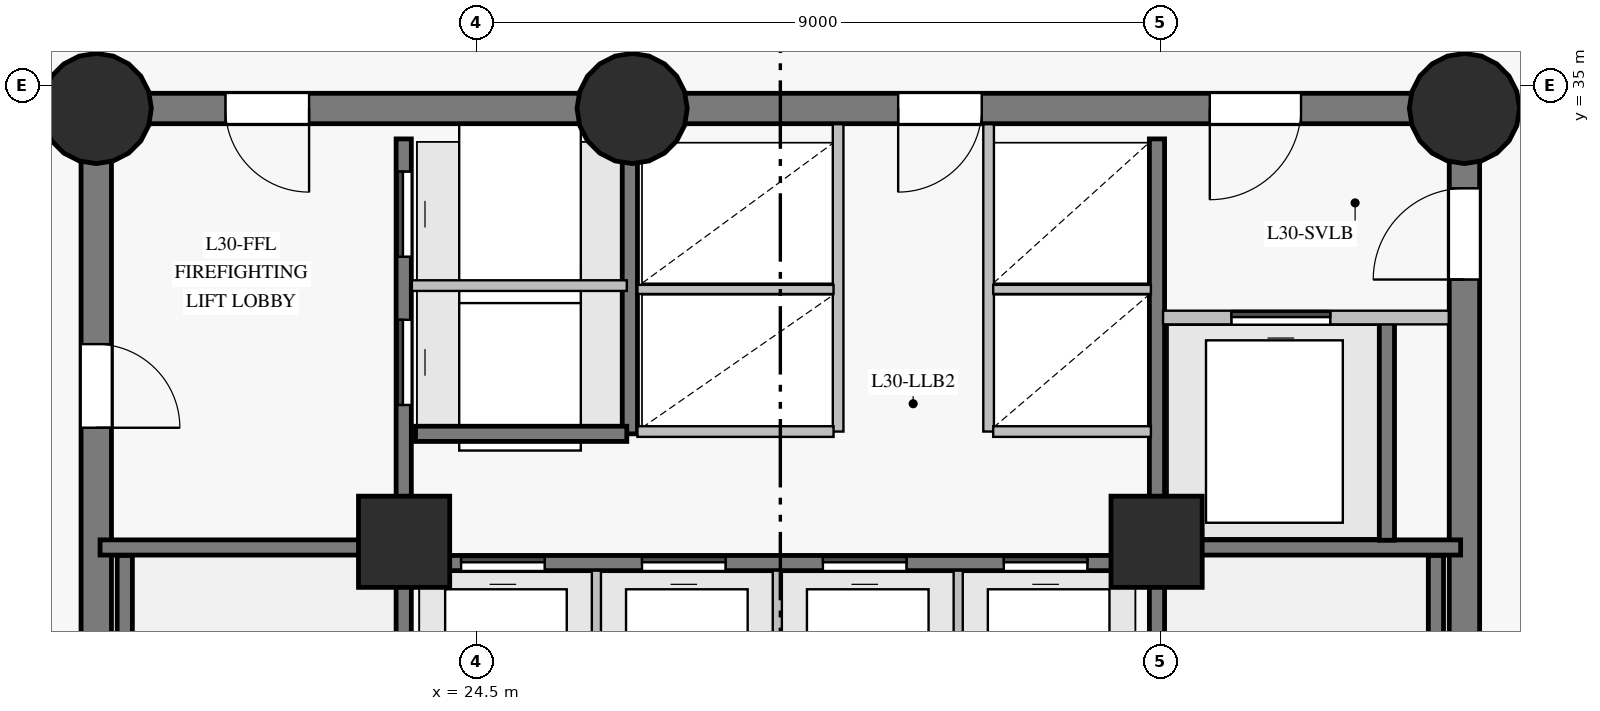
"""IFC4 building model, lengths in metres.
Left out: names, types, materials, properties, quantities, classifications, styles, units other than length and angle.
Written with IfcOpenShell. Run it as: python <this file> out.ifc"""

import sys

from ifc_helpers import new_model, si_unit, direction, frame, frame_2d, origin, origin_with_axes, origin_2d, place, context, subcontext, project, spatial, rectangle, circle, extrude, source, transform, mapped, element, fill, save


model = new_model("IFC4")
c1 = context("Model", 3, precision=1e-05, world=origin(), true_north=direction((0.0, 1.0)))
c2 = subcontext(c1, "Body", "Model", "MODEL_VIEW")
j1 = project(units=[si_unit("LENGTHUNIT", "METRE"), si_unit("PLANEANGLEUNIT", "RADIAN")], contexts=[c1])
p1 = place(None, origin())
s1 = spatial("IfcSite", under=j1, at=p1, CompositionType="ELEMENT")
p2 = place(p1, origin())
s2 = spatial("IfcBuilding", under=s1, at=p2, CompositionType="ELEMENT")
p3 = place(p2, frame((0.0, 0.0, 111.45)))
s3 = spatial("IfcBuildingStorey", under=s2, at=p3, CompositionType="ELEMENT", Elevation=111.45)
p4 = place(p3, frame((37.5, 18.3, 0.0), z_axis=(0.0, 0.0, 1.0), x_axis=(0.0, 1.0, 0.0)))
e1 = element("IfcWall", 1, at=p4, inside=s3, PredefinedType="SHEAR", context=c2, shape_type="SweptSolid", body=[
    extrude(rectangle(XDim=16.4, YDim=0.4, at=frame_2d((8.2, 0.0))), origin(), (0.0, 0.0, 1.0), 2.825),
])
p5 = place(p4, frame((14.15, 0.0, 0.0)))
e2 = element("IfcOpeningElement", 2, at=p5, cuts=e1, PredefinedType="OPENING", context=c2, shape_type="SweptSolid", body=[
    extrude(rectangle(XDim=1.2, YDim=2.15, at=frame_2d((0.6, 1.075))), frame((0.0, 0.21, 0.0), z_axis=(0.0, -1.0, 0.0), x_axis=(1.0, 0.0, 0.0)), (0.0, 0.0, 1.0), 0.42),
])
p6 = place(p3, frame((37.5, 34.7, 0.0), z_axis=(0.0, 0.0, 1.0), x_axis=(-1.0, 0.0, 0.0)))
e3 = element("IfcWall", 3, at=p6, inside=s3, PredefinedType="SHEAR", context=c2, shape_type="SweptSolid", body=[
    extrude(rectangle(XDim=10.95, YDim=0.4, at=frame_2d((5.475, 0.0))), origin(), (0.0, 0.0, 1.0), 2.825),
])
p7 = place(p6, frame((2.15, 0.0, 0.0)))
e4 = element("IfcOpeningElement", 4, at=p7, cuts=e3, PredefinedType="OPENING", context=c2, shape_type="SweptSolid", body=[
    extrude(rectangle(XDim=1.2, YDim=2.15, at=frame_2d((0.6, 1.075))), frame((0.0, 0.21, 0.0), z_axis=(0.0, -1.0, 0.0), x_axis=(1.0, 0.0, 0.0)), (0.0, 0.0, 1.0), 0.42),
])
p8 = place(p6, frame((6.35, 0.0, 0.0)))
e5 = element("IfcOpeningElement", 5, at=p8, cuts=e3, PredefinedType="OPENING", context=c2, shape_type="SweptSolid", body=[
    extrude(rectangle(XDim=1.1, YDim=2.15, at=frame_2d((0.55, 1.075))), frame((0.0, 0.21, 0.0), z_axis=(0.0, -1.0, 0.0), x_axis=(1.0, 0.0, 0.0)), (0.0, 0.0, 1.0), 0.42),
])
p9 = place(p3, frame((26.55, 34.7, 0.0), z_axis=(0.0, 0.0, 1.0), x_axis=(-1.0, 0.0, 0.0)))
e6 = element("IfcWall", 6, at=p9, inside=s3, PredefinedType="SHEAR", context=c2, shape_type="SweptSolid", body=[
    extrude(rectangle(XDim=7.05, YDim=0.4, at=frame_2d((3.525, 0.0))), origin(), (0.0, 0.0, 1.0), 2.825),
])
p10 = place(p9, frame((4.25, 0.0, 0.0)))
e7 = element("IfcOpeningElement", 7, at=p10, cuts=e6, PredefinedType="OPENING", context=c2, shape_type="SweptSolid", body=[
    extrude(rectangle(XDim=1.1, YDim=2.15, at=frame_2d((0.55, 1.075))), frame((0.0, 0.21, 0.0), z_axis=(0.0, -1.0, 0.0), x_axis=(1.0, 0.0, 0.0)), (0.0, 0.0, 1.0), 0.42),
])
p11 = place(p3, frame((19.5, 34.7, 0.0), z_axis=(0.0, 0.0, 1.0), x_axis=(0.0, -1.0, 0.0)))
e8 = element("IfcWall", 8, at=p11, inside=s3, PredefinedType="SHEAR", context=c2, shape_type="SweptSolid", body=[
    extrude(rectangle(XDim=16.4, YDim=0.4, at=frame_2d((8.2, 0.0))), origin(), (0.0, 0.0, 1.0), 2.825),
])
p12 = place(p11, frame((3.1, 0.0, 0.0)))
e9 = element("IfcOpeningElement", 9, at=p12, cuts=e8, PredefinedType="OPENING", context=c2, shape_type="SweptSolid", body=[
    extrude(rectangle(XDim=1.1, YDim=2.15, at=frame_2d((0.55, 1.075))), frame((0.0, 0.21, 0.0), z_axis=(0.0, -1.0, 0.0), x_axis=(1.0, 0.0, 0.0)), (0.0, 0.0, 1.0), 0.42),
])
m1 = source(origin_with_axes(), c2, "Body", "SweptSolid", [
    extrude(circle(Radius=0.725, at=origin_2d()), origin(), (0.0, 0.0, 1.0), 3.05),
])
for number, where, z_axis, x_axis in (
    (10, (19.5, 34.7, 0.0), (0.0, 0.0, 1.0), (1.0, 0.0, 0.0)),
    (11, (26.55, 34.7, 0.0), (0.0, 0.0, 1.0), (1.0, 0.0, 0.0)),
    (12, (37.5, 34.7, 0.0), (0.0, 0.0, 1.0), (1.0, 0.0, 0.0)),
):
    element("IfcColumn", number, at=place(p3, frame(where, z_axis=z_axis, x_axis=x_axis)), inside=s3, PredefinedType="COLUMN", context=c2, shape_type="MappedRepresentation", body=[
        mapped(m1, transform((0.0, 0.0, 0.0), scale=1.0)),
    ])
m2 = source(origin_with_axes(), c2, "Body", "SweptSolid", [
    extrude(rectangle(XDim=1.2, YDim=1.2, at=origin_2d()), origin(), (0.0, 0.0, 1.0), 3.05),
])
for number, where, z_axis, x_axis in (
    (13, (23.55, 29.0, 0.0), (0.0, 0.0, 1.0), (1.0, 0.0, 0.0)),
    (14, (33.45, 29.0, 0.0), (0.0, 0.0, 1.0), (1.0, 0.0, 0.0)),
):
    element("IfcColumn", number, at=place(p3, frame(where, z_axis=z_axis, x_axis=x_axis)), inside=s3, PredefinedType="COLUMN", context=c2, shape_type="MappedRepresentation", body=[
        mapped(m2, transform((0.0, 0.0, 0.0), scale=1.0)),
    ])
p13 = place(p3, frame((23.545, 18.7, 0.0), z_axis=(0.0, 0.0, 1.0), x_axis=(0.0, 1.0, 0.0)))
e15 = element("IfcWall", 15, at=p13, inside=s3, PredefinedType="SHEAR", context=c2, shape_type="SweptSolid", body=[
    extrude(rectangle(XDim=15.6, YDim=0.2, at=frame_2d((7.8, 0.0))), origin(), (0.0, 0.0, 1.0), 2.825),
])
p14 = place(p13, frame((2.75, 0.0, 0.0)))
e16 = element("IfcOpeningElement", 16, at=p14, cuts=e15, PredefinedType="OPENING", context=c2, shape_type="SweptSolid", body=[
    extrude(rectangle(XDim=1.15, YDim=2.15, at=frame_2d((0.575, 1.075))), frame((0.0, 0.11, 0.0), z_axis=(0.0, -1.0, 0.0), x_axis=(1.0, 0.0, 0.0)), (0.0, 0.0, 1.0), 0.22),
])
p15 = place(p13, frame((0.14, 0.0, 0.0)))
e17 = element("IfcOpeningElement", 17, at=p15, cuts=e15, PredefinedType="OPENING", context=c2, shape_type="SweptSolid", body=[
    extrude(rectangle(XDim=0.88, YDim=2.1, at=frame_2d((0.44, 1.05))), frame((0.0, 0.11, 0.0), z_axis=(0.0, -1.0, 0.0), x_axis=(1.0, 0.0, 0.0)), (0.0, 0.0, 1.0), 0.22),
])
p16 = place(p13, frame((1.36, 0.0, 0.0)))
e18 = element("IfcOpeningElement", 18, at=p16, cuts=e15, PredefinedType="OPENING", context=c2, shape_type="SweptSolid", body=[
    extrude(rectangle(XDim=0.88, YDim=2.1, at=frame_2d((0.44, 1.05))), frame((0.0, 0.11, 0.0), z_axis=(0.0, -1.0, 0.0), x_axis=(1.0, 0.0, 0.0)), (0.0, 0.0, 1.0), 0.22),
])
p17 = place(p13, frame((12.1, 0.0, 0.0)))
e19 = element("IfcOpeningElement", 19, at=p17, cuts=e15, PredefinedType="OPENING", context=c2, shape_type="SweptSolid", body=[
    extrude(rectangle(XDim=1.12, YDim=2.15, at=frame_2d((0.56, 1.075))), frame((0.0, 0.11, 0.0), z_axis=(0.0, -1.0, 0.0), x_axis=(1.0, 0.0, 0.0)), (0.0, 0.0, 1.0), 0.22),
])
p18 = place(p13, frame((14.05, 0.0, 0.0)))
e20 = element("IfcOpeningElement", 20, at=p18, cuts=e15, PredefinedType="OPENING", context=c2, shape_type="SweptSolid", body=[
    extrude(rectangle(XDim=1.12, YDim=2.15, at=frame_2d((0.56, 1.075))), frame((0.0, 0.11, 0.0), z_axis=(0.0, -1.0, 0.0), x_axis=(1.0, 0.0, 0.0)), (0.0, 0.0, 1.0), 0.22),
])
p19 = place(p3, frame((33.455, 18.7, 0.0), z_axis=(0.0, 0.0, 1.0), x_axis=(0.0, 1.0, 0.0)))
e21 = element("IfcWall", 21, at=p19, inside=s3, PredefinedType="SHEAR", context=c2, shape_type="SweptSolid", body=[
    extrude(rectangle(XDim=15.6, YDim=0.2, at=frame_2d((7.8, 0.0))), origin(), (0.0, 0.0, 1.0), 2.825),
])
p20 = place(p19, frame((2.75, 0.0, 0.0)))
e22 = element("IfcOpeningElement", 22, at=p20, cuts=e21, PredefinedType="OPENING", context=c2, shape_type="SweptSolid", body=[
    extrude(rectangle(XDim=1.15, YDim=2.15, at=frame_2d((0.575, 1.075))), frame((0.0, 0.11, 0.0), z_axis=(0.0, -1.0, 0.0), x_axis=(1.0, 0.0, 0.0)), (0.0, 0.0, 1.0), 0.22),
])
p21 = place(p19, frame((0.55, 0.0, 0.0)))
e23 = element("IfcOpeningElement", 23, at=p21, cuts=e21, PredefinedType="OPENING", context=c2, shape_type="SweptSolid", body=[
    extrude(rectangle(XDim=0.94, YDim=2.1, at=frame_2d((0.47, 1.05))), frame((0.0, 0.11, 0.0), z_axis=(0.0, -1.0, 0.0), x_axis=(1.0, 0.0, 0.0)), (0.0, 0.0, 1.0), 0.22),
])
p22 = place(p3, frame((23.7, 28.72, 0.0), z_axis=(0.0, 0.0, 1.0), x_axis=(1.0, 0.0, 0.0)))
e24 = element("IfcWall", 24, at=p22, inside=s3, PredefinedType="SHEAR", context=c2, shape_type="SweptSolid", body=[
    extrude(rectangle(XDim=9.6, YDim=0.2, at=frame_2d((4.8, 0.0))), origin(), (0.0, 0.0, 1.0), 2.825),
])
p23 = place(p22, frame((0.6, 0.0, 0.0)))
e25 = element("IfcOpeningElement", 25, at=p23, cuts=e24, PredefinedType="OPENING", context=c2, shape_type="SweptSolid", body=[
    extrude(rectangle(XDim=1.1, YDim=2.15, at=frame_2d((0.55, 1.075))), frame((0.0, 0.11, 0.0), z_axis=(0.0, -1.0, 0.0), x_axis=(1.0, 0.0, 0.0)), (0.0, 0.0, 1.0), 0.22),
])
p24 = place(p22, frame((2.98, 0.0, 0.0)))
e26 = element("IfcOpeningElement", 26, at=p24, cuts=e24, PredefinedType="OPENING", context=c2, shape_type="SweptSolid", body=[
    extrude(rectangle(XDim=1.1, YDim=2.15, at=frame_2d((0.55, 1.075))), frame((0.0, 0.11, 0.0), z_axis=(0.0, -1.0, 0.0), x_axis=(1.0, 0.0, 0.0)), (0.0, 0.0, 1.0), 0.22),
])
p25 = place(p22, frame((5.36, 0.0, 0.0)))
e27 = element("IfcOpeningElement", 27, at=p25, cuts=e24, PredefinedType="OPENING", context=c2, shape_type="SweptSolid", body=[
    extrude(rectangle(XDim=1.1, YDim=2.15, at=frame_2d((0.55, 1.075))), frame((0.0, 0.11, 0.0), z_axis=(0.0, -1.0, 0.0), x_axis=(1.0, 0.0, 0.0)), (0.0, 0.0, 1.0), 0.22),
])
p26 = place(p22, frame((7.74, 0.0, 0.0)))
e28 = element("IfcOpeningElement", 28, at=p26, cuts=e24, PredefinedType="OPENING", context=c2, shape_type="SweptSolid", body=[
    extrude(rectangle(XDim=1.1, YDim=2.15, at=frame_2d((0.55, 1.075))), frame((0.0, 0.11, 0.0), z_axis=(0.0, -1.0, 0.0), x_axis=(1.0, 0.0, 0.0)), (0.0, 0.0, 1.0), 0.22),
])
for number, where, z_axis, x_axis in (
    (29, (19.875, 21.32, 0.0), (0.0, 0.0, 1.0), (0.0, 1.0, 0.0)),
    (30, (37.125, 21.32, 0.0), (0.0, 0.0, 1.0), (0.0, 1.0, 0.0)),
):
    element("IfcWall", number, at=place(p3, frame(where, z_axis=z_axis, x_axis=x_axis)), inside=s3, PredefinedType="SHEAR", context=c2, shape_type="SweptSolid", body=[
        extrude(rectangle(XDim=7.5, YDim=0.2, at=frame_2d((3.75, 0.0))), origin(), (0.0, 0.0, 1.0), 2.825),
    ])
for number, where, z_axis, x_axis in (
    (31, (33.455, 28.925, 0.0), (0.0, 0.0, 1.0), (1.0, 0.0, 0.0)),
    (32, (19.55, 28.925, 0.0), (0.0, 0.0, 1.0), (1.0, 0.0, 0.0)),
):
    element("IfcWall", number, at=place(p3, frame(where, z_axis=z_axis, x_axis=x_axis)), inside=s3, PredefinedType="SHEAR", context=c2, shape_type="SweptSolid", body=[
        extrude(rectangle(XDim=3.995, YDim=0.2, at=frame_2d((1.998, 0.0))), origin(), (0.0, 0.0, 1.0), 2.825),
    ])
p27 = place(p3, frame((26.52, 30.42, 0.0), z_axis=(0.0, 0.0, 1.0), x_axis=(0.0, 1.0, 0.0)))
e33 = element("IfcWall", 33, at=p27, inside=s3, PredefinedType="SHEAR", context=c2, shape_type="SweptSolid", body=[
    extrude(rectangle(XDim=3.86, YDim=0.2, at=frame_2d((1.93, 0.0))), origin(), (0.0, 0.0, 1.0), 2.825),
])
p28 = place(p3, frame((36.48, 29.02, 0.0), z_axis=(0.0, 0.0, 1.0), x_axis=(0.0, 1.0, 0.0)))
e34 = element("IfcWall", 34, at=p28, inside=s3, PredefinedType="SHEAR", context=c2, shape_type="SweptSolid", body=[
    extrude(rectangle(XDim=2.86, YDim=0.2, at=frame_2d((1.43, 0.0))), origin(), (0.0, 0.0, 1.0), 2.825),
])
p29 = place(p3, frame((23.7, 30.42, 0.0), z_axis=(0.0, 0.0, 1.0), x_axis=(1.0, 0.0, 0.0)))
e35 = element("IfcWall", 35, at=p29, inside=s3, PredefinedType="SHEAR", context=c2, shape_type="SweptSolid", body=[
    extrude(rectangle(XDim=2.78, YDim=0.2, at=frame_2d((1.39, 0.0))), origin(), (0.0, 0.0, 1.0), 2.825),
])
for number, where, z_axis, x_axis in (
    (36, (29.26, 30.45, 0.0), (0.0, 0.0, 1.0), (0.0, 1.0, 0.0)),
    (37, (31.24, 30.45, 0.0), (0.0, 0.0, 1.0), (0.0, 1.0, 0.0)),
):
    element("IfcWall", number, at=place(p3, frame(where, z_axis=z_axis, x_axis=x_axis)), inside=s3, PredefinedType="PARTITIONING", context=c2, shape_type="SweptSolid", body=[
        extrude(rectangle(XDim=4.043, YDim=0.14, at=frame_2d((2.021, 0.0))), origin(), (0.0, 0.0, 1.0), 2.825),
    ])
p30 = place(p3, frame((33.535, 31.95, 0.0), z_axis=(0.0, 0.0, 1.0), x_axis=(1.0, 0.0, 0.0)))
e38 = element("IfcWall", 38, at=p30, inside=s3, PredefinedType="PARTITIONING", context=c2, shape_type="SweptSolid", body=[
    extrude(rectangle(XDim=3.759, YDim=0.18, at=frame_2d((1.879, 0.0))), origin(), (0.0, 0.0, 1.0), 2.825),
])
p31 = place(p30, frame((0.9, 0.0, 0.0)))
e39 = element("IfcOpeningElement", 39, at=p31, cuts=e38, PredefinedType="OPENING", context=c2, shape_type="SweptSolid", body=[
    extrude(rectangle(XDim=1.3, YDim=2.2, at=frame_2d((0.65, 1.1))), frame((0.0, 0.1, 0.0), z_axis=(0.0, -1.0, 0.0), x_axis=(1.0, 0.0, 0.0)), (0.0, 0.0, 1.0), 0.2),
])
p32 = place(p3, frame((23.652, 32.37, 0.0), z_axis=(0.0, 0.0, 1.0), x_axis=(1.0, 0.0, 0.0)))
e40 = element("IfcWall", 40, at=p32, inside=s3, PredefinedType="PARTITIONING", context=c2, shape_type="SweptSolid", body=[
    extrude(rectangle(XDim=2.828, YDim=0.14, at=frame_2d((1.414, 0.0))), origin(), (0.0, 0.0, 1.0), 2.825),
])
for number, where, z_axis, x_axis in (
    (41, (26.08, 26.02, 0.0), (0.0, 0.0, 1.0), (0.0, 1.0, 0.0)),
    (42, (28.46, 26.02, 0.0), (0.0, 0.0, 1.0), (0.0, 1.0, 0.0)),
    (43, (30.84, 26.02, 0.0), (0.0, 0.0, 1.0), (0.0, 1.0, 0.0)),
):
    element("IfcWall", number, at=place(p3, frame(where, z_axis=z_axis, x_axis=x_axis)), inside=s3, PredefinedType="PARTITIONING", context=c2, shape_type="SweptSolid", body=[
        extrude(rectangle(XDim=2.6, YDim=0.12, at=frame_2d((1.3, 0.0))), origin(), (0.0, 0.0, 1.0), 2.825),
    ])
p33 = place(p3, frame((26.62, 30.45, 0.0), z_axis=(0.0, 0.0, 1.0), x_axis=(1.0, 0.0, 0.0)))
e44 = element("IfcWall", 44, at=p33, inside=s3, PredefinedType="PARTITIONING", context=c2, shape_type="SweptSolid", body=[
    extrude(rectangle(XDim=2.58, YDim=0.14, at=frame_2d((1.29, 0.0))), origin(), (0.0, 0.0, 1.0), 2.825),
])
p34 = place(p3, frame((26.62, 32.32, 0.0), z_axis=(0.0, 0.0, 1.0), x_axis=(1.0, 0.0, 0.0)))
e45 = element("IfcWall", 45, at=p34, inside=s3, PredefinedType="PARTITIONING", context=c2, shape_type="SweptSolid", body=[
    extrude(rectangle(XDim=2.58, YDim=0.12, at=frame_2d((1.29, 0.0))), origin(), (0.0, 0.0, 1.0), 2.825),
])
p35 = place(p3, frame((31.3, 30.45, 0.0), z_axis=(0.0, 0.0, 1.0), x_axis=(1.0, 0.0, 0.0)))
e46 = element("IfcWall", 46, at=p35, inside=s3, PredefinedType="PARTITIONING", context=c2, shape_type="SweptSolid", body=[
    extrude(rectangle(XDim=2.075, YDim=0.14, at=frame_2d((1.038, 0.0))), origin(), (0.0, 0.0, 1.0), 2.825),
])
p36 = place(p3, frame((31.3, 32.32, 0.0), z_axis=(0.0, 0.0, 1.0), x_axis=(1.0, 0.0, 0.0)))
e47 = element("IfcWall", 47, at=p36, inside=s3, PredefinedType="PARTITIONING", context=c2, shape_type="SweptSolid", body=[
    extrude(rectangle(XDim=2.075, YDim=0.12, at=frame_2d((1.038, 0.0))), origin(), (0.0, 0.0, 1.0), 2.825),
])
m3 = source(origin_with_axes(), c2, "Body", "SweptSolid", [
    extrude(rectangle(XDim=1.1, YDim=2.15, at=frame_2d((0.55, 1.075))), frame((0.0, 0.025, 0.0), z_axis=(0.0, -1.0, 0.0), x_axis=(1.0, 0.0, 0.0)), (0.0, 0.0, 1.0), 0.05),
])
p37 = place(p10, origin())
e48 = element("IfcDoor", 48, at=p37, inside=s3, OperationType="SINGLE_SWING_LEFT", PredefinedType="DOOR", context=c2, shape_type="MappedRepresentation", body=[
    mapped(m3, transform((0.0, 0.0, 0.0), scale=1.0)),
])
fill(e7, e48)
p38 = place(p12, origin())
e49 = element("IfcDoor", 49, at=p38, inside=s3, OperationType="SINGLE_SWING_RIGHT", PredefinedType="DOOR", context=c2, shape_type="MappedRepresentation", body=[
    mapped(m3, transform((0.0, 0.0, 0.0), scale=1.0)),
])
fill(e9, e49)
m4 = source(origin_with_axes(), c2, "Body", "SweptSolid", [
    extrude(rectangle(XDim=1.2, YDim=2.15, at=frame_2d((0.6, 1.075))), frame((0.0, 0.025, 0.0), z_axis=(0.0, -1.0, 0.0), x_axis=(1.0, 0.0, 0.0)), (0.0, 0.0, 1.0), 0.05),
])
p39 = place(p5, origin())
e50 = element("IfcDoor", 50, at=p39, inside=s3, OperationType="SINGLE_SWING_LEFT", PredefinedType="DOOR", context=c2, shape_type="MappedRepresentation", body=[
    mapped(m4, transform((0.0, 0.0, 0.0), scale=1.0)),
])
fill(e2, e50)
p40 = place(p7, origin())
e51 = element("IfcDoor", 51, at=p40, inside=s3, OperationType="SINGLE_SWING_RIGHT", PredefinedType="DOOR", context=c2, shape_type="MappedRepresentation", body=[
    mapped(m4, transform((0.0, 0.0, 0.0), scale=1.0)),
])
fill(e4, e51)
m5 = source(origin_with_axes(), c2, "Body", "SweptSolid", [
    extrude(rectangle(XDim=1.3, YDim=2.2, at=frame_2d((0.65, 1.1))), frame((0.0, 0.025, 0.0), z_axis=(0.0, -1.0, 0.0), x_axis=(1.0, 0.0, 0.0)), (0.0, 0.0, 1.0), 0.05),
])
p41 = place(p31, origin())
e52 = element("IfcDoor", 52, at=p41, inside=s3, OperationType="SLIDING_TO_LEFT", PredefinedType="DOOR", context=c2, shape_type="MappedRepresentation", body=[
    mapped(m5, transform((0.0, 0.0, 0.0), scale=1.0)),
])
fill(e39, e52)
p42 = place(p23, origin())
e53 = element("IfcDoor", 53, at=p42, inside=s3, OperationType="SLIDING_TO_LEFT", PredefinedType="DOOR", context=c2, shape_type="MappedRepresentation", body=[
    mapped(m3, transform((0.0, 0.0, 0.0), scale=1.0)),
])
fill(e25, e53)
p43 = place(p24, origin())
e54 = element("IfcDoor", 54, at=p43, inside=s3, OperationType="SLIDING_TO_RIGHT", PredefinedType="DOOR", context=c2, shape_type="MappedRepresentation", body=[
    mapped(m3, transform((0.0, 0.0, 0.0), scale=1.0)),
])
fill(e26, e54)
p44 = place(p25, origin())
e55 = element("IfcDoor", 55, at=p44, inside=s3, OperationType="SLIDING_TO_LEFT", PredefinedType="DOOR", context=c2, shape_type="MappedRepresentation", body=[
    mapped(m3, transform((0.0, 0.0, 0.0), scale=1.0)),
])
fill(e27, e55)
p45 = place(p26, origin())
e56 = element("IfcDoor", 56, at=p45, inside=s3, OperationType="SLIDING_TO_RIGHT", PredefinedType="DOOR", context=c2, shape_type="MappedRepresentation", body=[
    mapped(m3, transform((0.0, 0.0, 0.0), scale=1.0)),
])
fill(e28, e56)
p46 = place(p8, origin())
e57 = element("IfcDoor", 57, at=p46, inside=s3, OperationType="SINGLE_SWING_RIGHT", PredefinedType="DOOR", context=c2, shape_type="MappedRepresentation", body=[
    mapped(m3, transform((0.0, 0.0, 0.0), scale=1.0)),
])
fill(e5, e57)
m6 = source(origin_with_axes(), c2, "Body", "SweptSolid", [
    extrude(rectangle(XDim=1.12, YDim=2.15, at=frame_2d((0.56, 1.075))), frame((0.0, 0.025, 0.0), z_axis=(0.0, -1.0, 0.0), x_axis=(1.0, 0.0, 0.0)), (0.0, 0.0, 1.0), 0.05),
])
p47 = place(p17, origin())
e58 = element("IfcDoor", 58, at=p47, inside=s3, OperationType="SLIDING_TO_LEFT", PredefinedType="DOOR", context=c2, shape_type="MappedRepresentation", body=[
    mapped(m6, transform((0.0, 0.0, 0.0), scale=1.0)),
])
fill(e19, e58)
p48 = place(p18, origin())
e59 = element("IfcDoor", 59, at=p48, inside=s3, OperationType="SLIDING_TO_RIGHT", PredefinedType="DOOR", context=c2, shape_type="MappedRepresentation", body=[
    mapped(m6, transform((0.0, 0.0, 0.0), scale=1.0)),
])
fill(e20, e59)
save(model, sys.argv[1])
